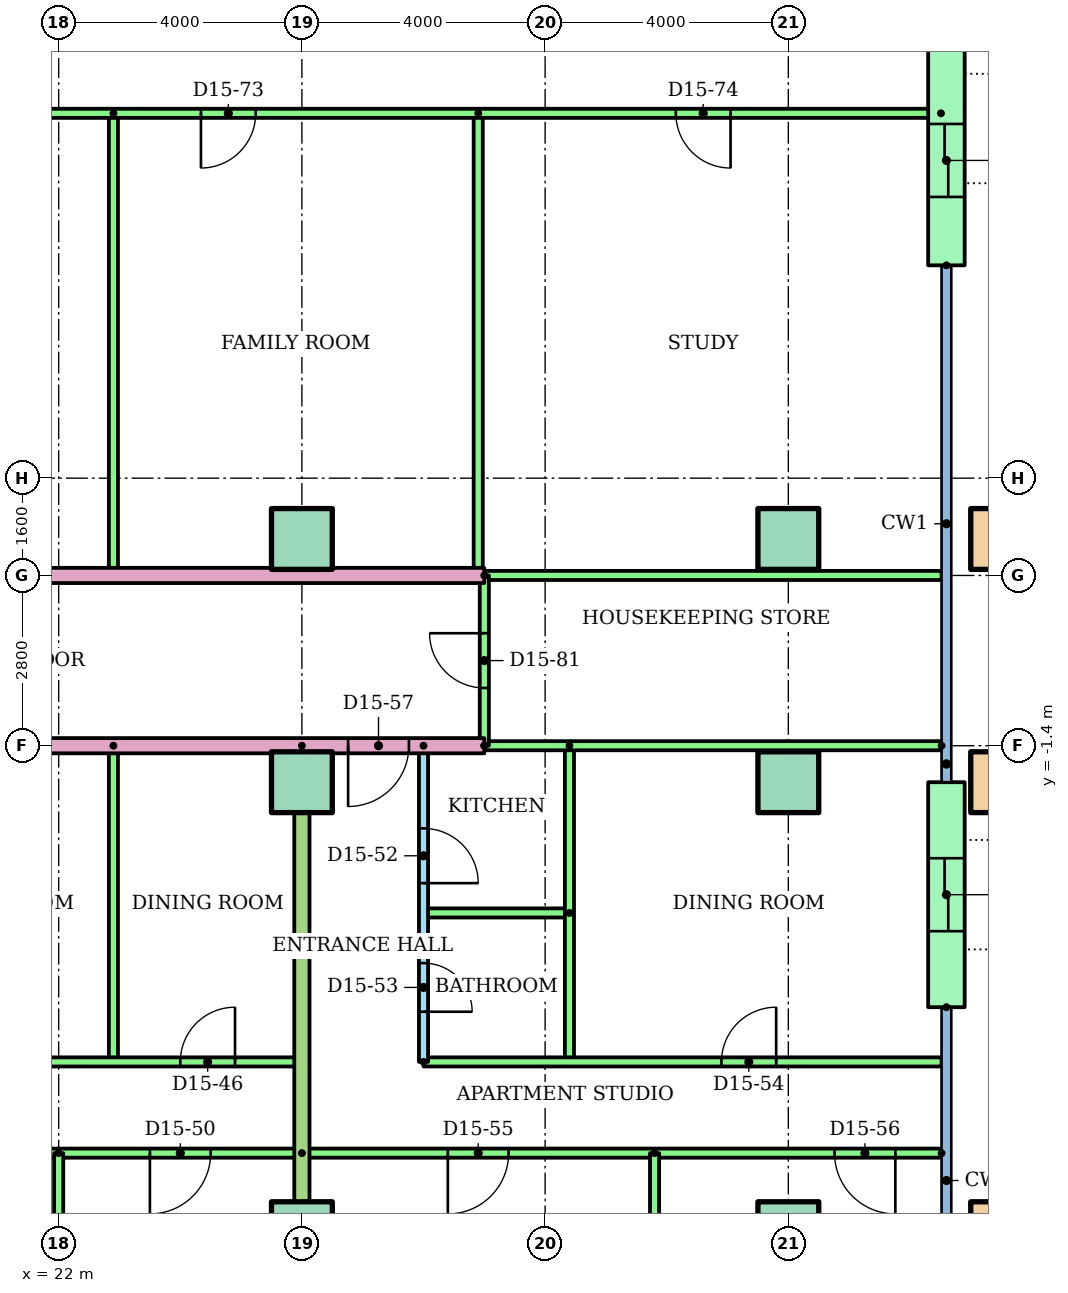
"""IFC4 building model, lengths in metres.
Left out: names, types, materials, properties, quantities, classifications, styles, units other than length and angle.
Written with IfcOpenShell. Run it as: python <this file> out.ifc"""

import sys

from ifc_helpers import new_model, si_unit, direction, frame, frame_2d, origin, origin_2d, place, context, subcontext, project, spatial, rectangle, hollow_rectangle, extrude, element, fill, save


model = new_model("IFC4")
c1 = context("Model", 3, precision=1e-05, world=origin(), true_north=direction((0.0, 1.0)))
c2 = subcontext(c1, "Body", "Model", "MODEL_VIEW")
j1 = project(units=[si_unit("LENGTHUNIT", "METRE"), si_unit("PLANEANGLEUNIT", "RADIAN")], contexts=[c1])
p1 = place(None, origin())
s1 = spatial("IfcSite", under=j1, at=p1, CompositionType="ELEMENT")
p2 = place(p1, origin())
s2 = spatial("IfcBuilding", under=s1, at=p2, CompositionType="ELEMENT")
p3 = place(p2, frame((0.0, 0.0, 57.6)))
s3 = spatial("IfcBuildingStorey", under=s2, at=p3, CompositionType="ELEMENT", Elevation=57.6)
for number, where in (
    (1, (26.0, -9.4, 0.0)),
    (2, (34.0, -9.4, 0.0)),
):
    element("IfcColumn", number, at=place(p3, frame(where)), inside=s3, PredefinedType="COLUMN", context=c2, shape_type="SweptSolid", body=[
        extrude(rectangle(XDim=1.0, YDim=1.0, at=origin_2d()), origin(), (0.0, 0.0, 1.0), 3.2),
    ])
p4 = place(p3, frame((37.5, -9.4, 0.0)))
e3 = element("IfcColumn", 3, at=p4, inside=s3, PredefinedType="COLUMN", context=c2, shape_type="SweptSolid", body=[
    extrude(hollow_rectangle(XDim=1.0, YDim=1.0, WallThickness=0.05, at=origin_2d()), origin(), (0.0, 0.0, 1.0), 3.2),
])
for number, where in (
    (4, (26.0, -2.0, 0.0)),
    (5, (34.0, -2.0, 0.0)),
):
    element("IfcColumn", number, at=place(p3, frame(where)), inside=s3, PredefinedType="COLUMN", context=c2, shape_type="SweptSolid", body=[
        extrude(rectangle(XDim=1.0, YDim=1.0, at=origin_2d()), origin(), (0.0, 0.0, 1.0), 3.2),
    ])
p5 = place(p3, frame((37.5, -2.0, 0.0)))
e6 = element("IfcColumn", 6, at=p5, inside=s3, PredefinedType="COLUMN", context=c2, shape_type="SweptSolid", body=[
    extrude(hollow_rectangle(XDim=1.0, YDim=1.0, WallThickness=0.05, at=origin_2d()), origin(), (0.0, 0.0, 1.0), 3.2),
])
for number, where in (
    (7, (26.0, 2.0, 0.0)),
    (8, (34.0, 2.0, 0.0)),
):
    element("IfcColumn", number, at=place(p3, frame(where)), inside=s3, PredefinedType="COLUMN", context=c2, shape_type="SweptSolid", body=[
        extrude(rectangle(XDim=1.0, YDim=1.0, at=origin_2d()), origin(), (0.0, 0.0, 1.0), 3.2),
    ])
p6 = place(p3, frame((37.5, 2.0, 0.0)))
e9 = element("IfcColumn", 9, at=p6, inside=s3, PredefinedType="COLUMN", context=c2, shape_type="SweptSolid", body=[
    extrude(hollow_rectangle(XDim=1.0, YDim=1.0, WallThickness=0.05, at=origin_2d()), origin(), (0.0, 0.0, 1.0), 3.2),
])
p7 = place(p3, frame((36.6, -5.7, 0.0), z_axis=(0.0, 0.0, 1.0), x_axis=(0.0, 1.0, 0.0)))
e10 = element("IfcWall", 10, at=p7, inside=s3, PredefinedType="STANDARD", context=c2, shape_type="SweptSolid", body=[
    extrude(rectangle(XDim=3.7, YDim=0.6, at=frame_2d((1.85, 0.0))), origin(), (0.0, 0.0, 1.0), 2.92),
])
p8 = place(p7, frame((1.25, 0.0, 0.0)))
e11 = element("IfcOpeningElement", 11, at=p8, cuts=e10, PredefinedType="OPENING", context=c2, shape_type="SweptSolid", body=[
    extrude(rectangle(XDim=1.2, YDim=2.1, at=frame_2d((0.6, 1.05))), frame((0.0, 0.31, 0.0), z_axis=(0.0, -1.0, 0.0), x_axis=(1.0, 0.0, 0.0)), (0.0, 0.0, 1.0), 0.62),
])
p9 = place(p3, frame((36.6, 6.5, 0.0), z_axis=(0.0, 0.0, 1.0), x_axis=(0.0, 1.0, 0.0)))
e12 = element("IfcWall", 12, at=p9, inside=s3, PredefinedType="STANDARD", context=c2, shape_type="SweptSolid", body=[
    extrude(rectangle(XDim=4.5, YDim=0.6, at=frame_2d((2.25, 0.0))), origin(), (0.0, 0.0, 1.0), 2.92),
])
p10 = place(p9, frame((1.125, 0.0, 0.0)))
e13 = element("IfcOpeningElement", 13, at=p10, cuts=e12, PredefinedType="OPENING", context=c2, shape_type="SweptSolid", body=[
    extrude(rectangle(XDim=1.2, YDim=2.1, at=frame_2d((0.6, 1.05))), frame((0.0, 0.31, 0.0), z_axis=(0.0, -1.0, 0.0), x_axis=(1.0, 0.0, 0.0)), (0.0, 0.0, 1.0), 0.62),
])
p11 = place(p3, frame((22.9, -1.4, 0.0), z_axis=(0.0, 0.0, 1.0), x_axis=(0.0, -1.0, 0.0)))
e14 = element("IfcWall", 14, at=p11, inside=s3, PredefinedType="PARTITIONING", context=c2, shape_type="SweptSolid", body=[
    extrude(rectangle(XDim=5.2, YDim=0.15, at=frame_2d((2.6, 0.0))), origin(), (0.0, 0.0, 1.0), 2.4),
])
p12 = place(p3, frame((12.0, -6.6, 0.0)))
e15 = element("IfcWall", 15, at=p12, inside=s3, PredefinedType="PARTITIONING", context=c2, shape_type="SweptSolid", body=[
    extrude(rectangle(XDim=14.0, YDim=0.15, at=frame_2d((7.0, 0.0))), origin(), (0.0, 0.0, 1.0), 2.4),
])
p13 = place(p12, frame((4.325, 0.0, 0.0)))
e16 = element("IfcOpeningElement", 16, at=p13, cuts=e15, PredefinedType="OPENING", context=c2, shape_type="SweptSolid", body=[
    extrude(rectangle(XDim=0.9, YDim=2.1, at=frame_2d((0.45, 1.05))), frame((0.0, 0.085, 0.0), z_axis=(0.0, -1.0, 0.0), x_axis=(1.0, 0.0, 0.0)), (0.0, 0.0, 1.0), 0.17),
])
p14 = place(p12, frame((8.575, 0.0, 0.0)))
e17 = element("IfcOpeningElement", 17, at=p14, cuts=e15, PredefinedType="OPENING", context=c2, shape_type="SweptSolid", body=[
    extrude(rectangle(XDim=0.9, YDim=2.1, at=frame_2d((0.45, 1.05))), frame((0.0, 0.085, 0.0), z_axis=(0.0, -1.0, 0.0), x_axis=(1.0, 0.0, 0.0)), (0.0, 0.0, 1.0), 0.17),
])
p15 = place(p12, frame((12.0, 0.0, 0.0)))
e18 = element("IfcOpeningElement", 18, at=p15, cuts=e15, PredefinedType="OPENING", context=c2, shape_type="SweptSolid", body=[
    extrude(rectangle(XDim=0.9, YDim=2.1, at=frame_2d((0.45, 1.05))), frame((0.0, 0.085, 0.0), z_axis=(0.0, -1.0, 0.0), x_axis=(1.0, 0.0, 0.0)), (0.0, 0.0, 1.0), 0.17),
])
p16 = place(p3, frame((26.0, -8.1, 0.0), z_axis=(0.0, 0.0, 1.0), x_axis=(-1.0, 0.0, 0.0)))
e19 = element("IfcWall", 19, at=p16, inside=s3, PredefinedType="PARTITIONING", context=c2, shape_type="SweptSolid", body=[
    extrude(rectangle(XDim=16.0, YDim=0.15, at=frame_2d((8.0, 0.0))), origin(), (0.0, 0.0, 1.0), 2.4),
])
p17 = place(p16, frame((13.55, 0.0, 0.0)))
e20 = element("IfcOpeningElement", 20, at=p17, cuts=e19, PredefinedType="OPENING", context=c2, shape_type="SweptSolid", body=[
    extrude(rectangle(XDim=0.9, YDim=2.1, at=frame_2d((0.45, 1.05))), frame((0.0, 0.085, 0.0), z_axis=(0.0, -1.0, 0.0), x_axis=(1.0, 0.0, 0.0)), (0.0, 0.0, 1.0), 0.17),
])
p18 = place(p16, frame((9.55, 0.0, 0.0)))
e21 = element("IfcOpeningElement", 21, at=p18, cuts=e19, PredefinedType="OPENING", context=c2, shape_type="SweptSolid", body=[
    extrude(rectangle(XDim=0.9, YDim=2.1, at=frame_2d((0.45, 1.05))), frame((0.0, 0.085, 0.0), z_axis=(0.0, -1.0, 0.0), x_axis=(1.0, 0.0, 0.0)), (0.0, 0.0, 1.0), 0.17),
])
p19 = place(p16, frame((5.55, 0.0, 0.0)))
e22 = element("IfcOpeningElement", 22, at=p19, cuts=e19, PredefinedType="OPENING", context=c2, shape_type="SweptSolid", body=[
    extrude(rectangle(XDim=0.9, YDim=2.1, at=frame_2d((0.45, 1.05))), frame((0.0, 0.085, 0.0), z_axis=(0.0, -1.0, 0.0), x_axis=(1.0, 0.0, 0.0)), (0.0, 0.0, 1.0), 0.17),
])
p20 = place(p16, frame((1.5, 0.0, 0.0)))
e23 = element("IfcOpeningElement", 23, at=p20, cuts=e19, PredefinedType="OPENING", context=c2, shape_type="SweptSolid", body=[
    extrude(rectangle(XDim=1.0, YDim=2.1, at=frame_2d((0.5, 1.05))), frame((0.0, 0.085, 0.0), z_axis=(0.0, -1.0, 0.0), x_axis=(1.0, 0.0, 0.0)), (0.0, 0.0, 1.0), 0.17),
])
p21 = place(p3, frame((22.0, -8.1, 0.0), z_axis=(0.0, 0.0, 1.0), x_axis=(0.0, -1.0, 0.0)))
e24 = element("IfcWall", 24, at=p21, inside=s3, PredefinedType="PARTITIONING", context=c2, shape_type="SweptSolid", body=[
    extrude(rectangle(XDim=8.021, YDim=0.15, at=frame_2d((4.01, 0.0))), origin(), (0.0, 0.0, 1.0), 2.4),
])
p22 = place(p3, frame((28.0, -1.4, 0.0), z_axis=(0.0, 0.0, 1.0), x_axis=(0.0, -1.0, 0.0)))
e25 = element("IfcWall", 25, at=p22, inside=s3, PredefinedType="PARTITIONING", context=c2, shape_type="SweptSolid", body=[
    extrude(rectangle(XDim=5.2, YDim=0.15, at=frame_2d((2.6, 0.0))), origin(), (0.0, 0.0, 1.0), 2.4),
])
p23 = place(p22, frame((1.36, 0.0, 0.0)))
e26 = element("IfcOpeningElement", 26, at=p23, cuts=e25, PredefinedType="OPENING", context=c2, shape_type="SweptSolid", body=[
    extrude(rectangle(XDim=0.9, YDim=2.1, at=frame_2d((0.45, 1.05))), frame((0.0, 0.085, 0.0), z_axis=(0.0, -1.0, 0.0), x_axis=(1.0, 0.0, 0.0)), (0.0, 0.0, 1.0), 0.17),
])
p24 = place(p22, frame((3.575, 0.0, 0.0)))
e27 = element("IfcOpeningElement", 27, at=p24, cuts=e25, PredefinedType="OPENING", context=c2, shape_type="SweptSolid", body=[
    extrude(rectangle(XDim=0.8, YDim=2.1, at=frame_2d((0.4, 1.05))), frame((0.0, 0.085, 0.0), z_axis=(0.0, -1.0, 0.0), x_axis=(1.0, 0.0, 0.0)), (0.0, 0.0, 1.0), 0.17),
])
p25 = place(p3, frame((30.4, -4.15, 0.0), z_axis=(0.0, 0.0, 1.0), x_axis=(-1.0, 0.0, 0.0)))
e28 = element("IfcWall", 28, at=p25, inside=s3, PredefinedType="PARTITIONING", context=c2, shape_type="SweptSolid", body=[
    extrude(rectangle(XDim=2.4, YDim=0.15, at=frame_2d((1.2, 0.0))), origin(), (0.0, 0.0, 1.0), 2.4),
])
p26 = place(p3, frame((30.4, -1.4, 0.0), z_axis=(0.0, 0.0, 1.0), x_axis=(0.0, -1.0, 0.0)))
e29 = element("IfcWall", 29, at=p26, inside=s3, PredefinedType="PARTITIONING", context=c2, shape_type="SweptSolid", body=[
    extrude(rectangle(XDim=5.2, YDim=0.15, at=frame_2d((2.6, 0.0))), origin(), (0.0, 0.0, 1.0), 2.4),
])
p27 = place(p3, frame((28.0, -6.6, 0.0)))
e30 = element("IfcWall", 30, at=p27, inside=s3, PredefinedType="PARTITIONING", context=c2, shape_type="SweptSolid", body=[
    extrude(rectangle(XDim=8.52, YDim=0.15, at=frame_2d((4.26, 0.0))), origin(), (0.0, 0.0, 1.0), 2.4),
])
p28 = place(p27, frame((4.9, 0.0, 0.0)))
e31 = element("IfcOpeningElement", 31, at=p28, cuts=e30, PredefinedType="OPENING", context=c2, shape_type="SweptSolid", body=[
    extrude(rectangle(XDim=0.9, YDim=2.1, at=frame_2d((0.45, 1.05))), frame((0.0, 0.085, 0.0), z_axis=(0.0, -1.0, 0.0), x_axis=(1.0, 0.0, 0.0)), (0.0, 0.0, 1.0), 0.17),
])
p29 = place(p3, frame((36.52, -8.1, 0.0), z_axis=(0.0, 0.0, 1.0), x_axis=(-1.0, 0.0, 0.0)))
e32 = element("IfcWall", 32, at=p29, inside=s3, PredefinedType="PARTITIONING", context=c2, shape_type="SweptSolid", body=[
    extrude(rectangle(XDim=10.52, YDim=0.15, at=frame_2d((5.26, 0.0))), origin(), (0.0, 0.0, 1.0), 2.4),
])
p30 = place(p29, frame((7.12, 0.0, 0.0)))
e33 = element("IfcOpeningElement", 33, at=p30, cuts=e32, PredefinedType="OPENING", context=c2, shape_type="SweptSolid", body=[
    extrude(rectangle(XDim=1.0, YDim=2.1, at=frame_2d((0.5, 1.05))), frame((0.0, 0.085, 0.0), z_axis=(0.0, -1.0, 0.0), x_axis=(1.0, 0.0, 0.0)), (0.0, 0.0, 1.0), 0.17),
])
p31 = place(p29, frame((0.76, 0.0, 0.0)))
e34 = element("IfcOpeningElement", 34, at=p31, cuts=e32, PredefinedType="OPENING", context=c2, shape_type="SweptSolid", body=[
    extrude(rectangle(XDim=1.0, YDim=2.1, at=frame_2d((0.5, 1.05))), frame((0.0, 0.085, 0.0), z_axis=(0.0, -1.0, 0.0), x_axis=(1.0, 0.0, 0.0)), (0.0, 0.0, 1.0), 0.17),
])
p32 = place(p3, frame((31.8, -8.1, 0.0), z_axis=(0.0, 0.0, 1.0), x_axis=(0.0, -1.0, 0.0)))
e35 = element("IfcWall", 35, at=p32, inside=s3, PredefinedType="PARTITIONING", context=c2, shape_type="SweptSolid", body=[
    extrude(rectangle(XDim=6.22, YDim=0.15, at=frame_2d((3.11, 0.0))), origin(), (0.0, 0.0, 1.0), 2.4),
])
p33 = place(p3, frame((26.0, -1.4, 0.0), z_axis=(0.0, 0.0, 1.0), x_axis=(0.0, -1.0, 0.0)))
e36 = element("IfcWall", 36, at=p33, inside=s3, PredefinedType="PARTITIONING", context=c2, shape_type="SweptSolid", body=[
    extrude(rectangle(XDim=14.71, YDim=0.25, at=frame_2d((7.355, 0.0))), origin(), (0.0, 0.0, 1.0), 2.4),
])
p34 = place(p3, frame((29.0, -1.4, 0.0), z_axis=(0.0, 0.0, 1.0), x_axis=(-1.0, 0.0, 0.0)))
e37 = element("IfcWall", 37, at=p34, inside=s3, PredefinedType="PARTITIONING", context=c2, shape_type="SweptSolid", body=[
    extrude(rectangle(XDim=15.0, YDim=0.25, at=frame_2d((7.5, 0.0))), origin(), (0.0, 0.0, 1.0), 2.4),
])
p35 = place(p34, frame((1.24, 0.0, 0.0)))
e38 = element("IfcOpeningElement", 38, at=p35, cuts=e37, PredefinedType="OPENING", context=c2, shape_type="SweptSolid", body=[
    extrude(rectangle(XDim=1.0, YDim=2.1, at=frame_2d((0.5, 1.05))), frame((0.0, 0.135, 0.0), z_axis=(0.0, -1.0, 0.0), x_axis=(1.0, 0.0, 0.0)), (0.0, 0.0, 1.0), 0.27),
])
p36 = place(p3, frame((36.52, -1.4, 0.0), z_axis=(0.0, 0.0, 1.0), x_axis=(-1.0, 0.0, 0.0)))
e39 = element("IfcWall", 39, at=p36, inside=s3, PredefinedType="PARTITIONING", context=c2, shape_type="SweptSolid", body=[
    extrude(rectangle(XDim=7.52, YDim=0.15, at=frame_2d((3.76, 0.0))), origin(), (0.0, 0.0, 1.0), 2.4),
])
for number, where, z_axis, x_axis in (
    (40, (22.9, 9.0, 0.0), (0.0, 0.0, 1.0), (0.0, -1.0, 0.0)),
    (41, (28.9, 9.0, 0.0), (0.0, 0.0, 1.0), (0.0, -1.0, 0.0)),
):
    element("IfcWall", number, at=place(p3, frame(where, z_axis=z_axis, x_axis=x_axis)), inside=s3, PredefinedType="PARTITIONING", context=c2, shape_type="SweptSolid", body=[
        extrude(rectangle(XDim=7.6, YDim=0.15, at=frame_2d((3.8, 0.0))), origin(), (0.0, 0.0, 1.0), 2.4),
    ])
p37 = place(p3, frame((36.51, 9.0, 0.0), z_axis=(0.0, 0.0, 1.0), x_axis=(-1.0, 0.0, 0.0)))
e42 = element("IfcWall", 42, at=p37, inside=s3, PredefinedType="PARTITIONING", context=c2, shape_type="SweptSolid", body=[
    extrude(rectangle(XDim=20.51, YDim=0.15, at=frame_2d((10.255, 0.0))), origin(), (0.0, 0.0, 1.0), 2.4),
])
p38 = place(p37, frame((15.41, 0.0, 0.0)))
e43 = element("IfcOpeningElement", 43, at=p38, cuts=e42, PredefinedType="OPENING", context=c2, shape_type="SweptSolid", body=[
    extrude(rectangle(XDim=0.9, YDim=2.1, at=frame_2d((0.45, 1.05))), frame((0.0, 0.085, 0.0), z_axis=(0.0, -1.0, 0.0), x_axis=(1.0, 0.0, 0.0)), (0.0, 0.0, 1.0), 0.17),
])
p39 = place(p37, frame((11.27, 0.0, 0.0)))
e44 = element("IfcOpeningElement", 44, at=p39, cuts=e42, PredefinedType="OPENING", context=c2, shape_type="SweptSolid", body=[
    extrude(rectangle(XDim=0.9, YDim=2.1, at=frame_2d((0.45, 1.05))), frame((0.0, 0.085, 0.0), z_axis=(0.0, -1.0, 0.0), x_axis=(1.0, 0.0, 0.0)), (0.0, 0.0, 1.0), 0.17),
])
p40 = place(p37, frame((3.46, 0.0, 0.0)))
e45 = element("IfcOpeningElement", 45, at=p40, cuts=e42, PredefinedType="OPENING", context=c2, shape_type="SweptSolid", body=[
    extrude(rectangle(XDim=0.9, YDim=2.1, at=frame_2d((0.45, 1.05))), frame((0.0, 0.085, 0.0), z_axis=(0.0, -1.0, 0.0), x_axis=(1.0, 0.0, 0.0)), (0.0, 0.0, 1.0), 0.17),
])
p41 = place(p3, frame((14.0, 1.4, 0.0)))
e46 = element("IfcWall", 46, at=p41, inside=s3, PredefinedType="PARTITIONING", context=c2, shape_type="SweptSolid", body=[
    extrude(rectangle(XDim=15.0, YDim=0.25, at=frame_2d((7.5, 0.0))), origin(), (0.0, 0.0, 1.0), 2.4),
])
p42 = place(p41, frame((0.5, 0.0, 0.0)))
e47 = element("IfcOpeningElement", 47, at=p42, cuts=e46, PredefinedType="OPENING", context=c2, shape_type="SweptSolid", body=[
    extrude(rectangle(XDim=1.0, YDim=2.1, at=frame_2d((0.5, 1.05))), frame((0.0, 0.135, 0.0), z_axis=(0.0, -1.0, 0.0), x_axis=(1.0, 0.0, 0.0)), (0.0, 0.0, 1.0), 0.27),
])
p43 = place(p3, frame((29.0, 1.4, 0.0)))
e48 = element("IfcWall", 48, at=p43, inside=s3, PredefinedType="PARTITIONING", context=c2, shape_type="SweptSolid", body=[
    extrude(rectangle(XDim=7.52, YDim=0.15, at=frame_2d((3.76, 0.0))), origin(), (0.0, 0.0, 1.0), 2.4),
])
p44 = place(p3, frame((29.0, -1.4, 0.0), z_axis=(0.0, 0.0, 1.0), x_axis=(0.0, 1.0, 0.0)))
e49 = element("IfcWall", 49, at=p44, inside=s3, PredefinedType="PARTITIONING", context=c2, shape_type="SweptSolid", body=[
    extrude(rectangle(XDim=2.8, YDim=0.15, at=frame_2d((1.4, 0.0))), origin(), (0.0, 0.0, 1.0), 2.4),
])
p45 = place(p44, frame((0.95, 0.0, 0.0)))
e50 = element("IfcOpeningElement", 50, at=p45, cuts=e49, PredefinedType="OPENING", context=c2, shape_type="SweptSolid", body=[
    extrude(rectangle(XDim=0.9, YDim=2.1, at=frame_2d((0.45, 1.05))), frame((0.0, 0.085, 0.0), z_axis=(0.0, -1.0, 0.0), x_axis=(1.0, 0.0, 0.0)), (0.0, 0.0, 1.0), 0.17),
])
p46 = place(p15, origin())
e51 = element("IfcDoor", 51, at=p46, inside=s3, OperationType="SINGLE_SWING_RIGHT", PredefinedType="DOOR", context=c2, shape_type="SweptSolid", body=[
    extrude(rectangle(XDim=0.9, YDim=2.1, at=frame_2d((0.45, 1.05))), frame((0.0, 0.025, 0.0), z_axis=(0.0, -1.0, 0.0), x_axis=(1.0, 0.0, 0.0)), (0.0, 0.0, 1.0), 0.05),
])
fill(e18, e51)
p47 = place(p20, origin())
e52 = element("IfcDoor", 52, at=p47, inside=s3, OperationType="SINGLE_SWING_RIGHT", PredefinedType="DOOR", context=c2, shape_type="SweptSolid", body=[
    extrude(rectangle(XDim=1.0, YDim=2.1, at=frame_2d((0.5, 1.05))), frame((0.0, 0.025, 0.0), z_axis=(0.0, -1.0, 0.0), x_axis=(1.0, 0.0, 0.0)), (0.0, 0.0, 1.0), 0.05),
])
fill(e23, e52)
p48 = place(p23, origin())
e53 = element("IfcDoor", 53, at=p48, inside=s3, OperationType="SINGLE_SWING_RIGHT", PredefinedType="DOOR", context=c2, shape_type="SweptSolid", body=[
    extrude(rectangle(XDim=0.9, YDim=2.1, at=frame_2d((0.45, 1.05))), frame((0.0, 0.025, 0.0), z_axis=(0.0, -1.0, 0.0), x_axis=(1.0, 0.0, 0.0)), (0.0, 0.0, 1.0), 0.05),
])
fill(e26, e53)
p49 = place(p24, origin())
e54 = element("IfcDoor", 54, at=p49, inside=s3, OperationType="SINGLE_SWING_RIGHT", PredefinedType="DOOR", context=c2, shape_type="SweptSolid", body=[
    extrude(rectangle(XDim=0.8, YDim=2.1, at=frame_2d((0.4, 1.05))), frame((0.0, 0.025, 0.0), z_axis=(0.0, -1.0, 0.0), x_axis=(1.0, 0.0, 0.0)), (0.0, 0.0, 1.0), 0.05),
])
fill(e27, e54)
p50 = place(p28, origin())
e55 = element("IfcDoor", 55, at=p50, inside=s3, OperationType="SINGLE_SWING_RIGHT", PredefinedType="DOOR", context=c2, shape_type="SweptSolid", body=[
    extrude(rectangle(XDim=0.9, YDim=2.1, at=frame_2d((0.45, 1.05))), frame((0.0, 0.025, 0.0), z_axis=(0.0, -1.0, 0.0), x_axis=(1.0, 0.0, 0.0)), (0.0, 0.0, 1.0), 0.05),
])
fill(e31, e55)
p51 = place(p30, origin())
e56 = element("IfcDoor", 56, at=p51, inside=s3, OperationType="SINGLE_SWING_RIGHT", PredefinedType="DOOR", context=c2, shape_type="SweptSolid", body=[
    extrude(rectangle(XDim=1.0, YDim=2.1, at=frame_2d((0.5, 1.05))), frame((0.0, 0.025, 0.0), z_axis=(0.0, -1.0, 0.0), x_axis=(1.0, 0.0, 0.0)), (0.0, 0.0, 1.0), 0.05),
])
fill(e33, e56)
p52 = place(p31, origin())
e57 = element("IfcDoor", 57, at=p52, inside=s3, OperationType="SINGLE_SWING_LEFT", PredefinedType="DOOR", context=c2, shape_type="SweptSolid", body=[
    extrude(rectangle(XDim=1.0, YDim=2.1, at=frame_2d((0.5, 1.05))), frame((0.0, 0.025, 0.0), z_axis=(0.0, -1.0, 0.0), x_axis=(1.0, 0.0, 0.0)), (0.0, 0.0, 1.0), 0.05),
])
fill(e34, e57)
p53 = place(p35, origin())
e58 = element("IfcDoor", 58, at=p53, inside=s3, OperationType="SINGLE_SWING_RIGHT", PredefinedType="DOOR", context=c2, shape_type="SweptSolid", body=[
    extrude(rectangle(XDim=1.0, YDim=2.1, at=frame_2d((0.5, 1.05))), frame((0.0, 0.025, 0.0), z_axis=(0.0, -1.0, 0.0), x_axis=(1.0, 0.0, 0.0)), (0.0, 0.0, 1.0), 0.05),
])
fill(e38, e58)
p54 = place(p39, origin())
e59 = element("IfcDoor", 59, at=p54, inside=s3, OperationType="SINGLE_SWING_RIGHT", PredefinedType="DOOR", context=c2, shape_type="SweptSolid", body=[
    extrude(rectangle(XDim=0.9, YDim=2.1, at=frame_2d((0.45, 1.05))), frame((0.0, 0.025, 0.0), z_axis=(0.0, -1.0, 0.0), x_axis=(1.0, 0.0, 0.0)), (0.0, 0.0, 1.0), 0.05),
])
fill(e44, e59)
p55 = place(p40, origin())
e60 = element("IfcDoor", 60, at=p55, inside=s3, OperationType="SINGLE_SWING_LEFT", PredefinedType="DOOR", context=c2, shape_type="SweptSolid", body=[
    extrude(rectangle(XDim=0.9, YDim=2.1, at=frame_2d((0.45, 1.05))), frame((0.0, 0.025, 0.0), z_axis=(0.0, -1.0, 0.0), x_axis=(1.0, 0.0, 0.0)), (0.0, 0.0, 1.0), 0.05),
])
fill(e45, e60)
p56 = place(p45, origin())
e61 = element("IfcDoor", 61, at=p56, inside=s3, OperationType="SINGLE_SWING_RIGHT", PredefinedType="DOOR", context=c2, shape_type="SweptSolid", body=[
    extrude(rectangle(XDim=0.9, YDim=2.1, at=frame_2d((0.45, 1.05))), frame((0.0, 0.025, 0.0), z_axis=(0.0, -1.0, 0.0), x_axis=(1.0, 0.0, 0.0)), (0.0, 0.0, 1.0), 0.05),
])
fill(e50, e61)
p57 = place(p8, origin())
e62 = element("IfcDoor", 62, at=p57, inside=s3, OperationType="SLIDING_TO_LEFT", PredefinedType="DOOR", context=c2, shape_type="SweptSolid", body=[
    extrude(rectangle(XDim=1.2, YDim=2.1, at=frame_2d((0.6, 1.05))), frame((0.0, 0.025, 0.0), z_axis=(0.0, -1.0, 0.0), x_axis=(1.0, 0.0, 0.0)), (0.0, 0.0, 1.0), 0.05),
])
fill(e11, e62)
p58 = place(p10, origin())
e63 = element("IfcDoor", 63, at=p58, inside=s3, OperationType="SLIDING_TO_LEFT", PredefinedType="DOOR", context=c2, shape_type="SweptSolid", body=[
    extrude(rectangle(XDim=1.2, YDim=2.1, at=frame_2d((0.6, 1.05))), frame((0.0, 0.025, 0.0), z_axis=(0.0, -1.0, 0.0), x_axis=(1.0, 0.0, 0.0)), (0.0, 0.0, 1.0), 0.05),
])
fill(e13, e63)
save(model, sys.argv[1])
